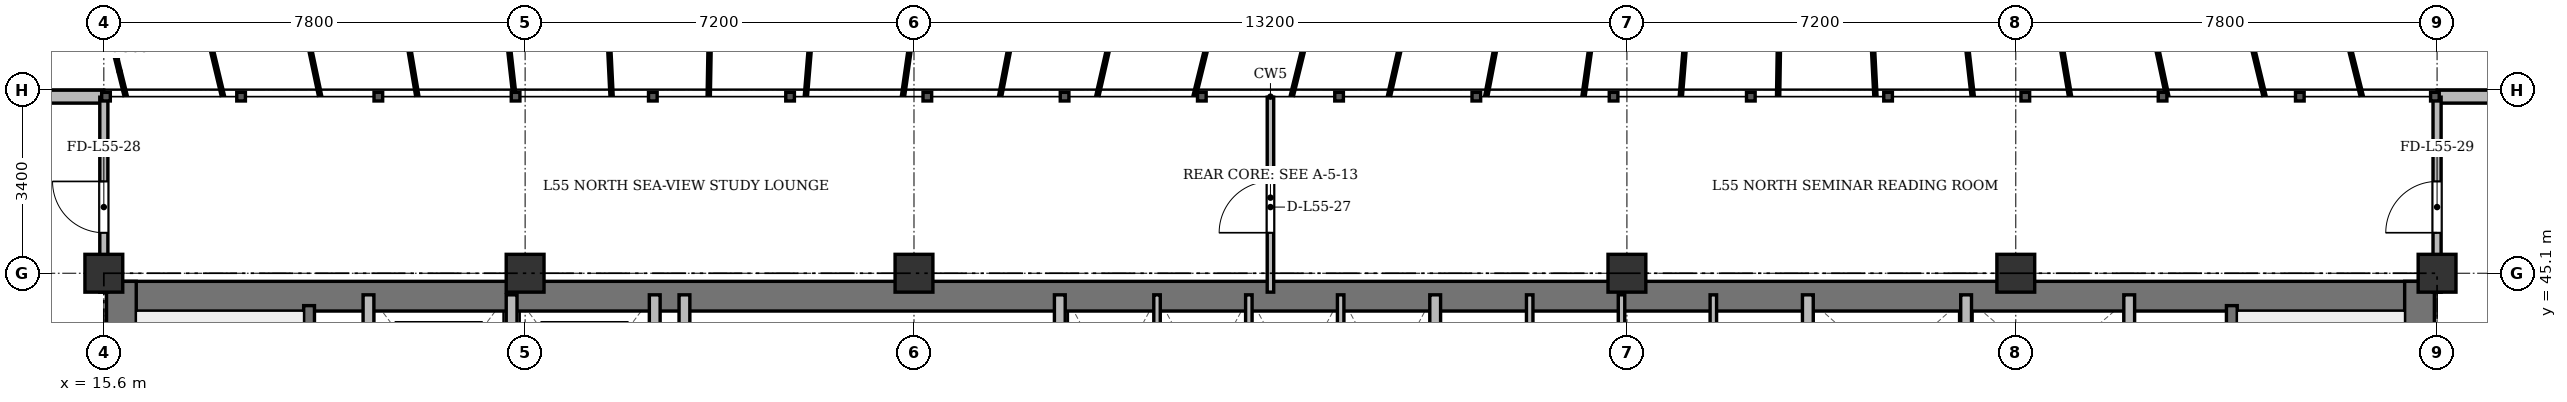
"""IFC4 building model, lengths in metres.
Left out: names, types, materials, properties, quantities, classifications, styles, units other than length and angle.
Written with IfcOpenShell. Run it as: python <this file> out.ifc"""

import sys

from ifc_helpers import new_model, si_unit, direction, frame, frame_2d, origin, origin_2d, place, context, subcontext, project, spatial, rectangle, extrude, source, transform, mapped, element, fill, save


model = new_model("IFC4")
c1 = context("Model", 3, precision=1e-05, world=origin(), true_north=direction((0.0, 1.0)))
c2 = subcontext(c1, "Body", "Model", "MODEL_VIEW")
j1 = project(units=[si_unit("LENGTHUNIT", "METRE"), si_unit("PLANEANGLEUNIT", "RADIAN")], contexts=[c1])
p1 = place(None, origin())
s1 = spatial("IfcSite", under=j1, at=p1, CompositionType="ELEMENT")
p2 = place(p1, origin())
s2 = spatial("IfcBuilding", under=s1, at=p2, CompositionType="ELEMENT")
p3 = place(p2, frame((0.0, 0.0, 212.1)))
s3 = spatial("IfcBuildingStorey", under=s2, at=p3, CompositionType="ELEMENT", Elevation=212.1)
m1 = source(origin(), c2, "Body", "SweptSolid", [
    extrude(rectangle(XDim=0.7, YDim=0.7, at=origin_2d()), origin(), (0.0, 0.0, 1.0), 3.6),
])
for number, where, z_axis, x_axis in (
    (1, (15.6, 45.1, 0.0), (0.0, 0.0, 1.0), (1.0, 0.0, 0.0)),
    (2, (23.4, 45.1, 0.0), (0.0, 0.0, 1.0), (1.0, 0.0, 0.0)),
    (3, (30.6, 45.1, 0.0), (0.0, 0.0, 1.0), (1.0, 0.0, 0.0)),
    (4, (43.8, 45.1, 0.0), (0.0, 0.0, 1.0), (1.0, 0.0, 0.0)),
    (5, (51.0, 45.1, 0.0), (0.0, 0.0, 1.0), (1.0, 0.0, 0.0)),
    (6, (58.8, 45.1, 0.0), (0.0, 0.0, 1.0), (1.0, 0.0, 0.0)),
):
    element("IfcColumn", number, at=place(p3, frame(where, z_axis=z_axis, x_axis=x_axis)), inside=s3, PredefinedType="COLUMN", context=c2, shape_type="MappedRepresentation", body=[
        mapped(m1, transform((0.0, 0.0, 0.0), x_axis=(1.0, 0.0, 0.0), y_axis=(0.0, 1.0, 0.0), z_axis=(0.0, 0.0, 1.0), scale=1.0)),
    ])
p4 = place(p3, frame((11.1, 48.37, 0.0), z_axis=(0.0, 0.0, 1.0), x_axis=(1.0, 0.0, 0.0)))
e7 = element("IfcWall", 7, at=p4, inside=s3, PredefinedType="SOLIDWALL", context=c2, shape_type="SweptSolid", body=[
    extrude(rectangle(XDim=4.5, YDim=0.24, at=frame_2d((2.25, 0.0))), origin(), (0.0, 0.0, 1.0), 3.36),
])
p5 = place(p4, frame((2.003, 0.0, 0.9)))
e8 = element("IfcOpeningElement", 8, at=p5, cuts=e7, PredefinedType="OPENING", context=c2, shape_type="SweptSolid", body=[
    extrude(rectangle(XDim=1.35, YDim=1.5, at=frame_2d((0.675, 0.75))), frame((0.0, 0.13, 0.0), z_axis=(0.0, -1.0, 0.0), x_axis=(1.0, 0.0, 0.0)), (0.0, 0.0, 1.0), 0.26),
])
p6 = place(p3, frame((58.8, 48.37, 0.0), z_axis=(0.0, 0.0, 1.0), x_axis=(1.0, 0.0, 0.0)))
e9 = element("IfcWall", 9, at=p6, inside=s3, PredefinedType="SOLIDWALL", context=c2, shape_type="SweptSolid", body=[
    extrude(rectangle(XDim=4.5, YDim=0.24, at=frame_2d((2.25, 0.0))), origin(), (0.0, 0.0, 1.0), 3.36),
])
p7 = place(p6, frame((1.147, 0.0, 0.9)))
e10 = element("IfcOpeningElement", 10, at=p7, cuts=e9, PredefinedType="OPENING", context=c2, shape_type="SweptSolid", body=[
    extrude(rectangle(XDim=1.35, YDim=1.5, at=frame_2d((0.675, 0.75))), frame((0.0, 0.13, 0.0), z_axis=(0.0, -1.0, 0.0), x_axis=(1.0, 0.0, 0.0)), (0.0, 0.0, 1.0), 0.26),
])
p8 = place(p3, frame((15.65, 44.675, 0.0), z_axis=(0.0, 0.0, 1.0), x_axis=(1.0, 0.0, 0.0)))
e11 = element("IfcWall", 11, at=p8, inside=s3, PredefinedType="SHEAR", context=c2, shape_type="SweptSolid", body=[
    extrude(rectangle(XDim=43.1, YDim=0.55, at=frame_2d((21.55, 0.0))), origin(), (0.0, 0.0, 1.0), 3.36),
])
for number, where, z_axis, x_axis in (
    (12, (15.925, 33.4, 0.0), (0.0, 0.0, 1.0), (0.0, 1.0, 0.0)),
    (13, (58.475, 33.4, 0.0), (0.0, 0.0, 1.0), (0.0, 1.0, 0.0)),
):
    element("IfcWall", number, at=place(p3, frame(where, z_axis=z_axis, x_axis=x_axis)), inside=s3, PredefinedType="SHEAR", context=c2, shape_type="SweptSolid", body=[
        extrude(rectangle(XDim=11.55, YDim=0.55, at=frame_2d((5.775, 0.0))), origin(), (0.0, 0.0, 1.0), 3.36),
    ])
p9 = place(p3, frame((19.4, 33.4, 0.0), z_axis=(0.0, 0.0, 1.0), x_axis=(0.0, 1.0, 0.0)))
e14 = element("IfcWall", 14, at=p9, inside=s3, PredefinedType="SHEAR", context=c2, shape_type="SweptSolid", body=[
    extrude(rectangle(XDim=11.1, YDim=0.2, at=frame_2d((5.55, 0.0))), origin(), (0.0, 0.0, 1.0), 3.36),
])
p10 = place(p9, frame((0.85, 0.0, 0.0)))
e15 = element("IfcOpeningElement", 15, at=p10, cuts=e14, PredefinedType="OPENING", context=c2, shape_type="SweptSolid", body=[
    extrude(rectangle(XDim=1.1, YDim=2.15, at=frame_2d((0.55, 1.075))), frame((0.0, 0.11, 0.0), z_axis=(0.0, -1.0, 0.0), x_axis=(1.0, 0.0, 0.0)), (0.0, 0.0, 1.0), 0.22),
])
p11 = place(p3, frame((55.0, 33.4, 0.0), z_axis=(0.0, 0.0, 1.0), x_axis=(0.0, 1.0, 0.0)))
e16 = element("IfcWall", 16, at=p11, inside=s3, PredefinedType="SHEAR", context=c2, shape_type="SweptSolid", body=[
    extrude(rectangle(XDim=11.1, YDim=0.2, at=frame_2d((5.55, 0.0))), origin(), (0.0, 0.0, 1.0), 3.36),
])
p12 = place(p11, frame((0.85, 0.0, 0.0)))
e17 = element("IfcOpeningElement", 17, at=p12, cuts=e16, PredefinedType="OPENING", context=c2, shape_type="SweptSolid", body=[
    extrude(rectangle(XDim=1.1, YDim=2.15, at=frame_2d((0.55, 1.075))), frame((0.0, 0.11, 0.0), z_axis=(0.0, -1.0, 0.0), x_axis=(1.0, 0.0, 0.0)), (0.0, 0.0, 1.0), 0.22),
])
for number, where, z_axis, x_axis in (
    (18, (20.5, 41.3, 0.0), (0.0, 0.0, 1.0), (0.0, 1.0, 0.0)),
    (19, (23.15, 41.3, 0.0), (0.0, 0.0, 1.0), (0.0, 1.0, 0.0)),
    (20, (25.8, 41.3, 0.0), (0.0, 0.0, 1.0), (0.0, 1.0, 0.0)),
):
    element("IfcWall", number, at=place(p3, frame(where, z_axis=z_axis, x_axis=x_axis)), inside=s3, PredefinedType="SOLIDWALL", context=c2, shape_type="SweptSolid", body=[
        extrude(rectangle(XDim=3.4, YDim=0.2, at=frame_2d((1.7, 0.0))), origin(), (0.0, 0.0, 1.0), 3.36),
    ])
for number, where, z_axis, x_axis in (
    (21, (26.35, 33.4, 0.0), (0.0, 0.0, 1.0), (0.0, 1.0, 0.0)),
    (22, (33.3, 33.4, 0.0), (0.0, 0.0, 1.0), (0.0, 1.0, 0.0)),
):
    element("IfcWall", number, at=place(p3, frame(where, z_axis=z_axis, x_axis=x_axis)), inside=s3, PredefinedType="SOLIDWALL", context=c2, shape_type="SweptSolid", body=[
        extrude(rectangle(XDim=11.3, YDim=0.2, at=frame_2d((5.65, 0.0))), origin(), (0.0, 0.0, 1.0), 2.91),
    ])
for number, where, z_axis, x_axis in (
    (23, (35.1, 41.5, 0.0), (0.0, 0.0, 1.0), (0.0, 1.0, 0.0)),
    (24, (36.8, 41.5, 0.0), (0.0, 0.0, 1.0), (0.0, 1.0, 0.0)),
    (25, (38.5, 41.5, 0.0), (0.0, 0.0, 1.0), (0.0, 1.0, 0.0)),
):
    element("IfcWall", number, at=place(p3, frame(where, z_axis=z_axis, x_axis=x_axis)), inside=s3, PredefinedType="PARTITIONING", context=c2, shape_type="SweptSolid", body=[
        extrude(rectangle(XDim=3.2, YDim=0.12, at=frame_2d((1.6, 0.0))), origin(), (0.0, 0.0, 1.0), 3.36),
    ])
p13 = place(p3, frame((40.25, 41.5, 0.0), z_axis=(0.0, 0.0, 1.0), x_axis=(0.0, 1.0, 0.0)))
e26 = element("IfcWall", 26, at=p13, inside=s3, PredefinedType="SOLIDWALL", context=c2, shape_type="SweptSolid", body=[
    extrude(rectangle(XDim=3.2, YDim=0.2, at=frame_2d((1.6, 0.0))), origin(), (0.0, 0.0, 1.0), 3.36),
])
for number, where, z_axis, x_axis in (
    (27, (42.0, 41.5, 0.0), (0.0, 0.0, 1.0), (0.0, 1.0, 0.0)),
    (28, (43.7, 41.5, 0.0), (0.0, 0.0, 1.0), (0.0, 1.0, 0.0)),
    (29, (45.4, 41.5, 0.0), (0.0, 0.0, 1.0), (0.0, 1.0, 0.0)),
):
    element("IfcWall", number, at=place(p3, frame(where, z_axis=z_axis, x_axis=x_axis)), inside=s3, PredefinedType="PARTITIONING", context=c2, shape_type="SweptSolid", body=[
        extrude(rectangle(XDim=3.2, YDim=0.12, at=frame_2d((1.6, 0.0))), origin(), (0.0, 0.0, 1.0), 3.36),
    ])
p14 = place(p3, frame((47.15, 33.4, 0.0), z_axis=(0.0, 0.0, 1.0), x_axis=(0.0, 1.0, 0.0)))
e30 = element("IfcWall", 30, at=p14, inside=s3, PredefinedType="SOLIDWALL", context=c2, shape_type="SweptSolid", body=[
    extrude(rectangle(XDim=11.3, YDim=0.2, at=frame_2d((5.65, 0.0))), origin(), (0.0, 0.0, 1.0), 2.91),
])
for number, where, z_axis, x_axis in (
    (31, (50.08, 42.05, 0.0), (0.0, 0.0, 1.0), (0.0, 1.0, 0.0)),
    (32, (53.1, 42.05, 0.0), (0.0, 0.0, 1.0), (0.0, 1.0, 0.0)),
):
    element("IfcWall", number, at=place(p3, frame(where, z_axis=z_axis, x_axis=x_axis)), inside=s3, PredefinedType="SOLIDWALL", context=c2, shape_type="SweptSolid", body=[
        extrude(rectangle(XDim=2.65, YDim=0.2, at=frame_2d((1.325, 0.0))), origin(), (0.0, 0.0, 1.0), 3.36),
    ])
p15 = place(p3, frame((37.2, 44.75, 0.0), z_axis=(0.0, 0.0, 1.0), x_axis=(0.0, 1.0, 0.0)))
e33 = element("IfcWall", 33, at=p15, inside=s3, PredefinedType="PARTITIONING", context=c2, shape_type="SweptSolid", body=[
    extrude(rectangle(XDim=3.61, YDim=0.12, at=frame_2d((1.805, 0.0))), origin(), (0.0, 0.0, 1.0), 2.91),
])
p16 = place(p15, frame((1.1, 0.0, 0.0)))
e34 = element("IfcOpeningElement", 34, at=p16, cuts=e33, PredefinedType="OPENING", context=c2, shape_type="SweptSolid", body=[
    extrude(rectangle(XDim=0.95, YDim=2.15, at=frame_2d((0.475, 1.075))), frame((0.0, 0.07, 0.0), z_axis=(0.0, -1.0, 0.0), x_axis=(1.0, 0.0, 0.0)), (0.0, 0.0, 1.0), 0.14),
])
p17 = place(p3, frame((15.6, 44.75, 0.0), z_axis=(0.0, 0.0, 1.0), x_axis=(0.0, 1.0, 0.0)))
e35 = element("IfcWall", 35, at=p17, inside=s3, PredefinedType="PARTITIONING", context=c2, shape_type="SweptSolid", body=[
    extrude(rectangle(XDim=3.61, YDim=0.15, at=frame_2d((1.805, 0.0))), origin(), (0.0, 0.0, 1.0), 2.86),
])
p18 = place(p17, frame((1.1, 0.0, 0.0)))
e36 = element("IfcOpeningElement", 36, at=p18, cuts=e35, PredefinedType="OPENING", context=c2, shape_type="SweptSolid", body=[
    extrude(rectangle(XDim=0.95, YDim=2.15, at=frame_2d((0.475, 1.075))), frame((0.0, 0.085, 0.0), z_axis=(0.0, -1.0, 0.0), x_axis=(1.0, 0.0, 0.0)), (0.0, 0.0, 1.0), 0.17),
])
p19 = place(p3, frame((58.8, 44.75, 0.0), z_axis=(0.0, 0.0, 1.0), x_axis=(0.0, 1.0, 0.0)))
e37 = element("IfcWall", 37, at=p19, inside=s3, PredefinedType="PARTITIONING", context=c2, shape_type="SweptSolid", body=[
    extrude(rectangle(XDim=3.61, YDim=0.15, at=frame_2d((1.805, 0.0))), origin(), (0.0, 0.0, 1.0), 2.86),
])
p20 = place(p19, frame((1.1, 0.0, 0.0)))
e38 = element("IfcOpeningElement", 38, at=p20, cuts=e37, PredefinedType="OPENING", context=c2, shape_type="SweptSolid", body=[
    extrude(rectangle(XDim=0.95, YDim=2.15, at=frame_2d((0.475, 1.075))), frame((0.0, 0.085, 0.0), z_axis=(0.0, -1.0, 0.0), x_axis=(1.0, 0.0, 0.0)), (0.0, 0.0, 1.0), 0.17),
])
m2 = source(origin(), c2, "Body", "SweptSolid", [
    extrude(rectangle(XDim=0.95, YDim=2.15, at=frame_2d((0.475, 1.075))), frame((0.0, 0.025, 0.0), z_axis=(0.0, -1.0, 0.0), x_axis=(1.0, 0.0, 0.0)), (0.0, 0.0, 1.0), 0.05),
])
p21 = place(p16, origin())
e39 = element("IfcDoor", 39, at=p21, inside=s3, OperationType="SINGLE_SWING_LEFT", PredefinedType="DOOR", context=c2, shape_type="MappedRepresentation", body=[
    mapped(m2, transform((0.0, 0.0, 0.0), x_axis=(1.0, 0.0, 0.0), y_axis=(0.0, 1.0, 0.0), z_axis=(0.0, 0.0, 1.0), scale=1.0)),
])
fill(e34, e39)
p22 = place(p18, origin())
e40 = element("IfcDoor", 40, at=p22, inside=s3, OperationType="SINGLE_SWING_RIGHT", PredefinedType="DOOR", context=c2, shape_type="MappedRepresentation", body=[
    mapped(m2, transform((0.0, 0.0, 0.0), x_axis=(1.0, 0.0, 0.0), y_axis=(0.0, 1.0, 0.0), z_axis=(0.0, 0.0, 1.0), scale=1.0)),
])
fill(e36, e40)
p23 = place(p20, origin())
e41 = element("IfcDoor", 41, at=p23, inside=s3, OperationType="SINGLE_SWING_LEFT", PredefinedType="DOOR", context=c2, shape_type="MappedRepresentation", body=[
    mapped(m2, transform((0.0, 0.0, 0.0), x_axis=(1.0, 0.0, 0.0), y_axis=(0.0, 1.0, 0.0), z_axis=(0.0, 0.0, 1.0), scale=1.0)),
])
fill(e38, e41)
save(model, sys.argv[1])
